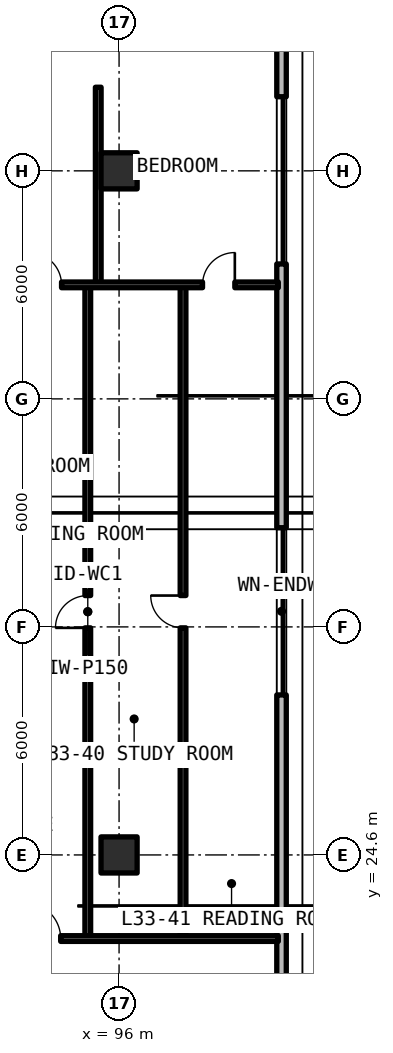
"""IFC4 building model, lengths in metres.
Left out: names, types, materials, properties, quantities, classifications, styles, units other than length and angle.
Written with IfcOpenShell. Run it as: python <this file> out.ifc"""

import sys

from ifc_helpers import new_model, si_unit, direction, frame, frame_2d, origin, origin_2d, place, context, subcontext, project, spatial, rectangle, extrude, element, fill, save


model = new_model("IFC4")
c1 = context("Model", 3, precision=1e-05, world=origin(), true_north=direction((0.0, 1.0)))
c2 = subcontext(c1, "Body", "Model", "MODEL_VIEW")
j1 = project(units=[si_unit("LENGTHUNIT", "METRE"), si_unit("PLANEANGLEUNIT", "RADIAN")], contexts=[c1])
p1 = place(None, origin())
s1 = spatial("IfcSite", under=j1, at=p1, CompositionType="ELEMENT")
p2 = place(p1, origin())
s2 = spatial("IfcBuilding", under=s1, at=p2, CompositionType="ELEMENT")
p3 = place(p2, frame((0.0, 0.0, 119.46)))
s3 = spatial("IfcBuildingStorey", under=s2, at=p3, CompositionType="ELEMENT", Elevation=119.46)
for number, where, z_axis, x_axis in (
    (1, (96.0, 24.6, 0.0), (0.0, 0.0, 1.0), (1.0, 0.0, 0.0)),
    (2, (96.0, 42.6, 0.0), (0.0, 0.0, 1.0), (1.0, 0.0, 0.0)),
):
    element("IfcColumn", number, at=place(p3, frame(where, z_axis=z_axis, x_axis=x_axis)), inside=s3, PredefinedType="COLUMN", context=c2, shape_type="SweptSolid", body=[
        extrude(rectangle(XDim=0.95, YDim=0.95, at=origin_2d()), origin(), (0.0, 0.0, 1.0), 3.63),
    ])
p4 = place(p3, frame((100.275, 13.852, 0.0), z_axis=(0.0, 0.0, 1.0), x_axis=(0.0, 1.0, 0.0)))
e3 = element("IfcWall", 3, at=p4, inside=s3, PredefinedType="SOLIDWALL", context=c2, shape_type="SweptSolid", body=[
    extrude(rectangle(XDim=39.496, YDim=0.25, at=frame_2d((19.748, 0.0))), origin(), (0.0, 0.0, 1.0), 3.35),
])
p5 = place(p4, frame((14.958, 0.0, 0.78)))
e4 = element("IfcOpeningElement", 4, at=p5, cuts=e3, PredefinedType="OPENING", context=c2, shape_type="SweptSolid", body=[
    extrude(rectangle(XDim=4.4, YDim=1.66, at=frame_2d((2.2, 0.83))), frame((0.0, 0.135, 0.0), z_axis=(0.0, -1.0, 0.0), x_axis=(1.0, 0.0, 0.0)), (0.0, 0.0, 1.0), 0.27),
])
p6 = place(p4, frame((26.298, 0.0, 0.78)))
e5 = element("IfcOpeningElement", 5, at=p6, cuts=e3, PredefinedType="OPENING", context=c2, shape_type="SweptSolid", body=[
    extrude(rectangle(XDim=4.4, YDim=1.66, at=frame_2d((2.2, 0.83))), frame((0.0, 0.135, 0.0), z_axis=(0.0, -1.0, 0.0), x_axis=(1.0, 0.0, 0.0)), (0.0, 0.0, 1.0), 0.27),
])
p7 = place(p4, frame((2.454, 0.0, 0.78)))
e6 = element("IfcOpeningElement", 6, at=p7, cuts=e3, PredefinedType="OPENING", context=c2, shape_type="SweptSolid", body=[
    extrude(rectangle(XDim=1.4, YDim=1.65, at=frame_2d((0.7, 0.825))), frame((0.0, 0.135, 0.0), z_axis=(0.0, -1.0, 0.0), x_axis=(1.0, 0.0, 0.0)), (0.0, 0.0, 1.0), 0.27),
])
p8 = place(p3, frame((95.177, 22.4, 0.0), z_axis=(0.0, 0.0, 1.0), x_axis=(0.0, 1.0, 0.0)))
e7 = element("IfcWall", 7, at=p8, inside=s3, PredefinedType="PARTITIONING", context=c2, shape_type="SweptSolid", body=[
    extrude(rectangle(XDim=17.2, YDim=0.15, at=frame_2d((8.6, 0.0))), origin(), (0.0, 0.0, 1.0), 2.57),
])
p9 = place(p8, frame((8.175, 0.0, 0.0)))
e8 = element("IfcOpeningElement", 8, at=p9, cuts=e7, PredefinedType="OPENING", context=c2, shape_type="SweptSolid", body=[
    extrude(rectangle(XDim=0.85, YDim=2.1, at=frame_2d((0.425, 1.05))), frame((0.0, 0.085, 0.0), z_axis=(0.0, -1.0, 0.0), x_axis=(1.0, 0.0, 0.0)), (0.0, 0.0, 1.0), 0.17),
])
p10 = place(p3, frame((97.683, 22.4, 0.0), z_axis=(0.0, 0.0, 1.0), x_axis=(0.0, 1.0, 0.0)))
e9 = element("IfcWall", 9, at=p10, inside=s3, PredefinedType="PARTITIONING", context=c2, shape_type="SweptSolid", body=[
    extrude(rectangle(XDim=17.2, YDim=0.15, at=frame_2d((8.6, 0.0))), origin(), (0.0, 0.0, 1.0), 2.57),
])
p11 = place(p10, frame((8.175, 0.0, 0.0)))
e10 = element("IfcOpeningElement", 10, at=p11, cuts=e9, PredefinedType="OPENING", context=c2, shape_type="SweptSolid", body=[
    extrude(rectangle(XDim=0.85, YDim=2.1, at=frame_2d((0.425, 1.05))), frame((0.0, 0.085, 0.0), z_axis=(0.0, -1.0, 0.0), x_axis=(1.0, 0.0, 0.0)), (0.0, 0.0, 1.0), 0.17),
])
p12 = place(p3, frame((95.452, 39.6, 0.0), z_axis=(0.0, 0.0, 1.0), x_axis=(0.0, 1.0, 0.0)))
e11 = element("IfcWall", 11, at=p12, inside=s3, PredefinedType="PARTITIONING", context=c2, shape_type="SweptSolid", body=[
    extrude(rectangle(XDim=5.2, YDim=0.15, at=frame_2d((2.6, 0.0))), origin(), (0.0, 0.0, 1.0), 2.57),
])
p13 = place(p3, frame((90.32, 39.6, 0.0), z_axis=(0.0, 0.0, 1.0), x_axis=(1.0, 0.0, 0.0)))
e12 = element("IfcWall", 12, at=p13, inside=s3, PredefinedType="PARTITIONING", context=c2, shape_type="SweptSolid", body=[
    extrude(rectangle(XDim=9.87, YDim=0.15, at=frame_2d((4.935, 0.0))), origin(), (0.0, 0.0, 1.0), 2.57),
])
p14 = place(p13, frame((3.316, 0.0, 0.0)))
e13 = element("IfcOpeningElement", 13, at=p14, cuts=e12, PredefinedType="OPENING", context=c2, shape_type="SweptSolid", body=[
    extrude(rectangle(XDim=0.85, YDim=2.1, at=frame_2d((0.425, 1.05))), frame((0.0, 0.085, 0.0), z_axis=(0.0, -1.0, 0.0), x_axis=(1.0, 0.0, 0.0)), (0.0, 0.0, 1.0), 0.17),
])
p15 = place(p13, frame((7.876, 0.0, 0.0)))
e14 = element("IfcOpeningElement", 14, at=p15, cuts=e12, PredefinedType="OPENING", context=c2, shape_type="SweptSolid", body=[
    extrude(rectangle(XDim=0.85, YDim=2.1, at=frame_2d((0.425, 1.05))), frame((0.0, 0.085, 0.0), z_axis=(0.0, -1.0, 0.0), x_axis=(1.0, 0.0, 0.0)), (0.0, 0.0, 1.0), 0.17),
])
p16 = place(p3, frame((90.32, 22.4, 0.0), z_axis=(0.0, 0.0, 1.0), x_axis=(1.0, 0.0, 0.0)))
e15 = element("IfcWall", 15, at=p16, inside=s3, PredefinedType="SOLIDWALL", context=c2, shape_type="SweptSolid", body=[
    extrude(rectangle(XDim=9.87, YDim=0.15, at=frame_2d((4.935, 0.0))), origin(), (0.0, 0.0, 1.0), 2.57),
])
p17 = place(p16, frame((3.193, 0.0, 0.0)))
e16 = element("IfcOpeningElement", 16, at=p17, cuts=e15, PredefinedType="OPENING", context=c2, shape_type="SweptSolid", body=[
    extrude(rectangle(XDim=0.95, YDim=2.15, at=frame_2d((0.475, 1.075))), frame((0.0, 0.085, 0.0), z_axis=(0.0, -1.0, 0.0), x_axis=(1.0, 0.0, 0.0)), (0.0, 0.0, 1.0), 0.17),
])
p18 = place(p5, origin())
e17 = element("IfcWindow", 17, at=p18, inside=s3, PartitioningType="SINGLE_PANEL", PredefinedType="WINDOW", context=c2, shape_type="SweptSolid", body=[
    extrude(rectangle(XDim=4.4, YDim=1.66, at=frame_2d((2.2, 0.83))), frame((0.0, 0.03, 0.0), z_axis=(0.0, -1.0, 0.0), x_axis=(1.0, 0.0, 0.0)), (0.0, 0.0, 1.0), 0.06),
])
fill(e4, e17)
p19 = place(p6, origin())
e18 = element("IfcWindow", 18, at=p19, inside=s3, PartitioningType="SINGLE_PANEL", PredefinedType="WINDOW", context=c2, shape_type="SweptSolid", body=[
    extrude(rectangle(XDim=4.4, YDim=1.66, at=frame_2d((2.2, 0.83))), frame((0.0, 0.03, 0.0), z_axis=(0.0, -1.0, 0.0), x_axis=(1.0, 0.0, 0.0)), (0.0, 0.0, 1.0), 0.06),
])
fill(e5, e18)
p20 = place(p9, origin())
e19 = element("IfcDoor", 19, at=p20, inside=s3, OperationType="SINGLE_SWING_LEFT", PredefinedType="DOOR", context=c2, shape_type="SweptSolid", body=[
    extrude(rectangle(XDim=0.85, YDim=2.1, at=frame_2d((0.425, 1.05))), frame((0.0, 0.025, 0.0), z_axis=(0.0, -1.0, 0.0), x_axis=(1.0, 0.0, 0.0)), (0.0, 0.0, 1.0), 0.05),
])
fill(e8, e19)
p21 = place(p11, origin())
e20 = element("IfcDoor", 20, at=p21, inside=s3, OperationType="SINGLE_SWING_RIGHT", PredefinedType="DOOR", context=c2, shape_type="SweptSolid", body=[
    extrude(rectangle(XDim=0.85, YDim=2.1, at=frame_2d((0.425, 1.05))), frame((0.0, 0.025, 0.0), z_axis=(0.0, -1.0, 0.0), x_axis=(1.0, 0.0, 0.0)), (0.0, 0.0, 1.0), 0.05),
])
fill(e10, e20)
p22 = place(p14, origin())
e21 = element("IfcDoor", 21, at=p22, inside=s3, OperationType="SINGLE_SWING_LEFT", PredefinedType="DOOR", context=c2, shape_type="SweptSolid", body=[
    extrude(rectangle(XDim=0.85, YDim=2.1, at=frame_2d((0.425, 1.05))), frame((0.0, 0.025, 0.0), z_axis=(0.0, -1.0, 0.0), x_axis=(1.0, 0.0, 0.0)), (0.0, 0.0, 1.0), 0.05),
])
fill(e13, e21)
p23 = place(p15, origin())
e22 = element("IfcDoor", 22, at=p23, inside=s3, OperationType="SINGLE_SWING_RIGHT", PredefinedType="DOOR", context=c2, shape_type="SweptSolid", body=[
    extrude(rectangle(XDim=0.85, YDim=2.1, at=frame_2d((0.425, 1.05))), frame((0.0, 0.025, 0.0), z_axis=(0.0, -1.0, 0.0), x_axis=(1.0, 0.0, 0.0)), (0.0, 0.0, 1.0), 0.05),
])
fill(e14, e22)
p24 = place(p17, origin())
e23 = element("IfcDoor", 23, at=p24, inside=s3, OperationType="SINGLE_SWING_LEFT", PredefinedType="DOOR", context=c2, shape_type="SweptSolid", body=[
    extrude(rectangle(XDim=0.95, YDim=2.15, at=frame_2d((0.475, 1.075))), frame((0.0, 0.025, 0.0), z_axis=(0.0, -1.0, 0.0), x_axis=(1.0, 0.0, 0.0)), (0.0, 0.0, 1.0), 0.05),
])
fill(e16, e23)
save(model, sys.argv[1])
